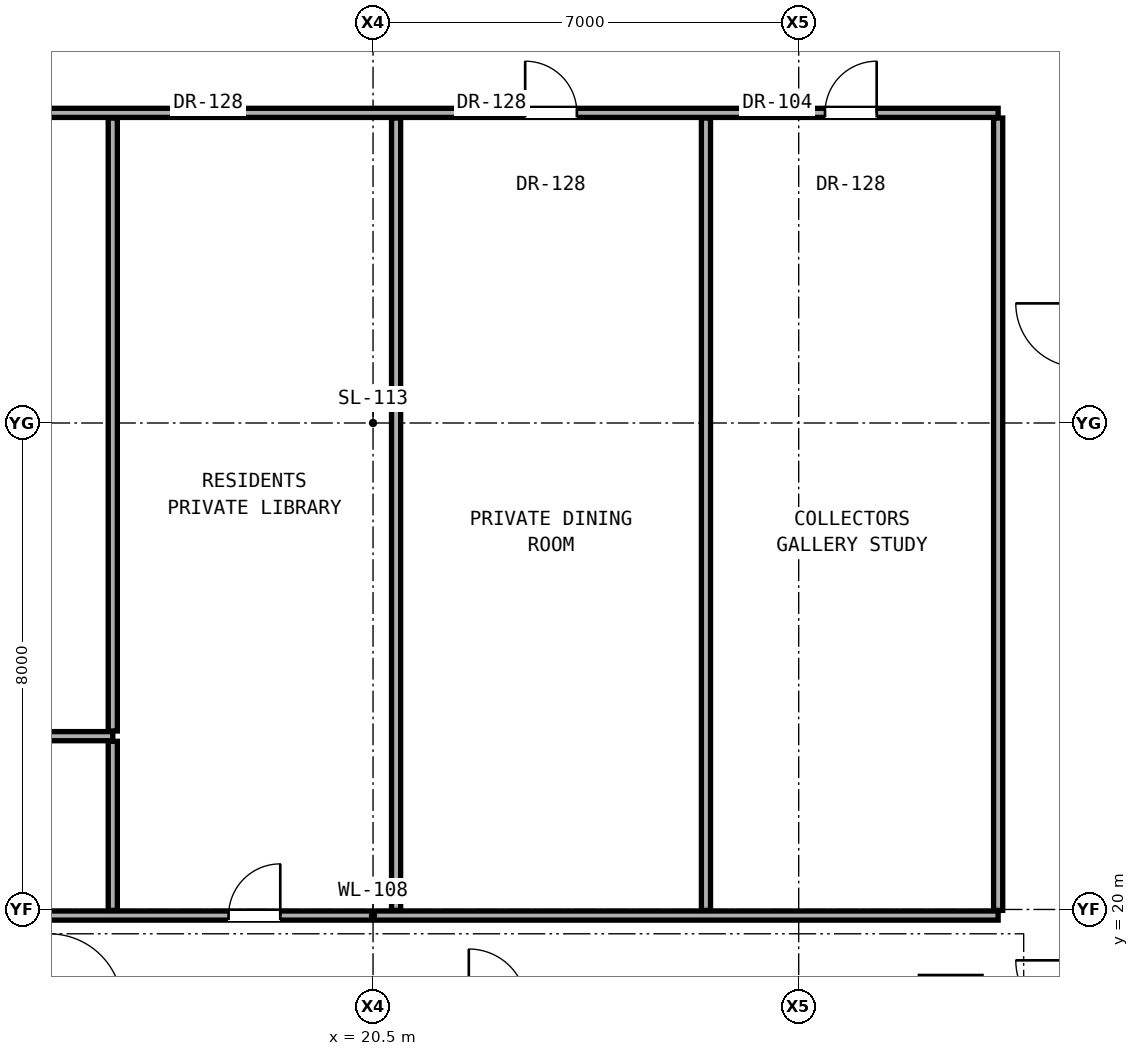
"""IFC4 building model, lengths in metres.
Left out: names, types, materials, properties, quantities, classifications, styles, units other than length and angle.
Written with IfcOpenShell. Run it as: python <this file> out.ifc"""

import sys

from ifc_helpers import new_model, si_unit, direction, frame, frame_2d, origin, place, context, subcontext, project, spatial, rectangle, extrude, element, fill, save


model = new_model("IFC4")
c1 = context("Model", 3, precision=1e-05, world=origin(), true_north=direction((0.0, 1.0)))
c2 = subcontext(c1, "Body", "Model", "MODEL_VIEW")
j1 = project(units=[si_unit("LENGTHUNIT", "METRE"), si_unit("PLANEANGLEUNIT", "RADIAN")], contexts=[c1])
p1 = place(None, origin())
s1 = spatial("IfcSite", under=j1, at=p1, CompositionType="ELEMENT")
p2 = place(p1, origin())
s2 = spatial("IfcBuilding", under=s1, at=p2, CompositionType="ELEMENT")
p3 = place(p2, frame((0.0, 0.0, 180.4)))
s3 = spatial("IfcBuildingStorey", under=s2, at=p3, CompositionType="ELEMENT", Elevation=180.4)
p4 = place(p3, frame((10.22, 19.9, 0.0), z_axis=(0.0, 0.0, 1.0), x_axis=(1.0, 0.0, 0.0)))
e1 = element("IfcWall", 1, at=p4, inside=s3, PredefinedType="PARTITIONING", context=c2, shape_type="SweptSolid", body=[
    extrude(rectangle(XDim=20.56, YDim=0.15, at=frame_2d((10.28, 0.0))), origin(), (0.0, 0.0, 1.0), 2.186),
])
p5 = place(p4, frame((1.66, 0.0, 0.0)))
e2 = element("IfcOpeningElement", 2, at=p5, cuts=e1, PredefinedType="OPENING", context=c2, shape_type="SweptSolid", body=[
    extrude(rectangle(XDim=0.9, YDim=2.1, at=frame_2d((0.45, 1.05))), frame((0.0, 0.085, 0.0), z_axis=(0.0, -1.0, 0.0), x_axis=(1.0, 0.0, 0.0)), (0.0, 0.0, 1.0), 0.17),
])
p6 = place(p4, frame((4.015, 0.0, 0.0)))
e3 = element("IfcOpeningElement", 3, at=p6, cuts=e1, PredefinedType="OPENING", context=c2, shape_type="SweptSolid", body=[
    extrude(rectangle(XDim=0.95, YDim=2.15, at=frame_2d((0.475, 1.075))), frame((0.0, 0.085, 0.0), z_axis=(0.0, -1.0, 0.0), x_axis=(1.0, 0.0, 0.0)), (0.0, 0.0, 1.0), 0.17),
])
p7 = place(p4, frame((7.905, 0.0, 0.0)))
e4 = element("IfcOpeningElement", 4, at=p7, cuts=e1, PredefinedType="OPENING", context=c2, shape_type="SweptSolid", body=[
    extrude(rectangle(XDim=0.85, YDim=2.01, at=frame_2d((0.425, 1.005))), frame((0.0, 0.085, 0.0), z_axis=(0.0, -1.0, 0.0), x_axis=(1.0, 0.0, 0.0)), (0.0, 0.0, 1.0), 0.17),
])
p8 = place(p3, frame((10.22, 22.85, 0.0), z_axis=(0.0, 0.0, 1.0), x_axis=(1.0, 0.0, 0.0)))
e5 = element("IfcWall", 5, at=p8, inside=s3, PredefinedType="PARTITIONING", context=c2, shape_type="SweptSolid", body=[
    extrude(rectangle(XDim=6.0, YDim=0.15, at=frame_2d((3.0, 0.0))), origin(), (0.0, 0.0, 1.0), 2.186),
])
p9 = place(p3, frame((10.22, 33.1, 0.0), z_axis=(0.0, 0.0, 1.0), x_axis=(1.0, 0.0, 0.0)))
e6 = element("IfcWall", 6, at=p9, inside=s3, PredefinedType="PARTITIONING", context=c2, shape_type="SweptSolid", body=[
    extrude(rectangle(XDim=20.56, YDim=0.15, at=frame_2d((10.28, 0.0))), origin(), (0.0, 0.0, 1.0), 2.186),
])
p10 = place(p9, frame((12.782, 0.0, 0.0)))
e7 = element("IfcOpeningElement", 7, at=p10, cuts=e6, PredefinedType="OPENING", context=c2, shape_type="SweptSolid", body=[
    extrude(rectangle(XDim=0.85, YDim=2.01, at=frame_2d((0.425, 1.005))), frame((0.0, 0.085, 0.0), z_axis=(0.0, -1.0, 0.0), x_axis=(1.0, 0.0, 0.0)), (0.0, 0.0, 1.0), 0.17),
])
p11 = place(p9, frame((17.712, 0.0, 0.0)))
e8 = element("IfcOpeningElement", 8, at=p11, cuts=e6, PredefinedType="OPENING", context=c2, shape_type="SweptSolid", body=[
    extrude(rectangle(XDim=0.85, YDim=2.01, at=frame_2d((0.425, 1.005))), frame((0.0, 0.085, 0.0), z_axis=(0.0, -1.0, 0.0), x_axis=(1.0, 0.0, 0.0)), (0.0, 0.0, 1.0), 0.17),
])
p12 = place(p3, frame((16.22, 19.985, 0.0), z_axis=(0.0, 0.0, 1.0), x_axis=(0.0, 1.0, 0.0)))
e9 = element("IfcWall", 9, at=p12, inside=s3, PredefinedType="PARTITIONING", context=c2, shape_type="SweptSolid", body=[
    extrude(rectangle(XDim=2.78, YDim=0.15, at=frame_2d((1.39, 0.0))), origin(), (0.0, 0.0, 1.0), 3.05),
])
p13 = place(p3, frame((16.22, 22.935, 0.0), z_axis=(0.0, 0.0, 1.0), x_axis=(0.0, 1.0, 0.0)))
e10 = element("IfcWall", 10, at=p13, inside=s3, PredefinedType="PARTITIONING", context=c2, shape_type="SweptSolid", body=[
    extrude(rectangle(XDim=10.08, YDim=0.15, at=frame_2d((5.04, 0.0))), origin(), (0.0, 0.0, 1.0), 2.186),
])
for number, where, z_axis, x_axis in (
    (11, (20.879, 19.985, 0.0), (0.0, 0.0, 1.0), (0.0, 1.0, 0.0)),
    (12, (25.975, 19.985, 0.0), (0.0, 0.0, 1.0), (0.0, 1.0, 0.0)),
):
    element("IfcWall", number, at=place(p3, frame(where, z_axis=z_axis, x_axis=x_axis)), inside=s3, PredefinedType="PARTITIONING", context=c2, shape_type="SweptSolid", body=[
        extrude(rectangle(XDim=13.03, YDim=0.15, at=frame_2d((6.515, 0.0))), origin(), (0.0, 0.0, 1.0), 2.186),
    ])
p14 = place(p3, frame((30.78, 19.985, 0.0), z_axis=(0.0, 0.0, 1.0), x_axis=(0.0, 1.0, 0.0)))
e13 = element("IfcWall", 13, at=p14, inside=s3, PredefinedType="PARTITIONING", context=c2, shape_type="SweptSolid", body=[
    extrude(rectangle(XDim=13.03, YDim=0.15, at=frame_2d((6.515, 0.0))), origin(), (0.0, 0.0, 1.0), 2.346),
])
p15 = place(p7, origin())
e14 = element("IfcDoor", 14, at=p15, inside=s3, OperationType="SINGLE_SWING_RIGHT", PredefinedType="DOOR", context=c2, shape_type="SweptSolid", body=[
    extrude(rectangle(XDim=0.85, YDim=2.01, at=frame_2d((0.425, 1.005))), frame((0.0, 0.025, 0.0), z_axis=(0.0, -1.0, 0.0), x_axis=(1.0, 0.0, 0.0)), (0.0, 0.0, 1.0), 0.05),
])
fill(e4, e14)
p16 = place(p10, origin())
e15 = element("IfcDoor", 15, at=p16, inside=s3, OperationType="SINGLE_SWING_LEFT", PredefinedType="DOOR", context=c2, shape_type="SweptSolid", body=[
    extrude(rectangle(XDim=0.85, YDim=2.01, at=frame_2d((0.425, 1.005))), frame((0.0, 0.025, 0.0), z_axis=(0.0, -1.0, 0.0), x_axis=(1.0, 0.0, 0.0)), (0.0, 0.0, 1.0), 0.05),
])
fill(e7, e15)
p17 = place(p11, origin())
e16 = element("IfcDoor", 16, at=p17, inside=s3, OperationType="SINGLE_SWING_RIGHT", PredefinedType="DOOR", context=c2, shape_type="SweptSolid", body=[
    extrude(rectangle(XDim=0.85, YDim=2.01, at=frame_2d((0.425, 1.005))), frame((0.0, 0.025, 0.0), z_axis=(0.0, -1.0, 0.0), x_axis=(1.0, 0.0, 0.0)), (0.0, 0.0, 1.0), 0.05),
])
fill(e8, e16)
save(model, sys.argv[1])
